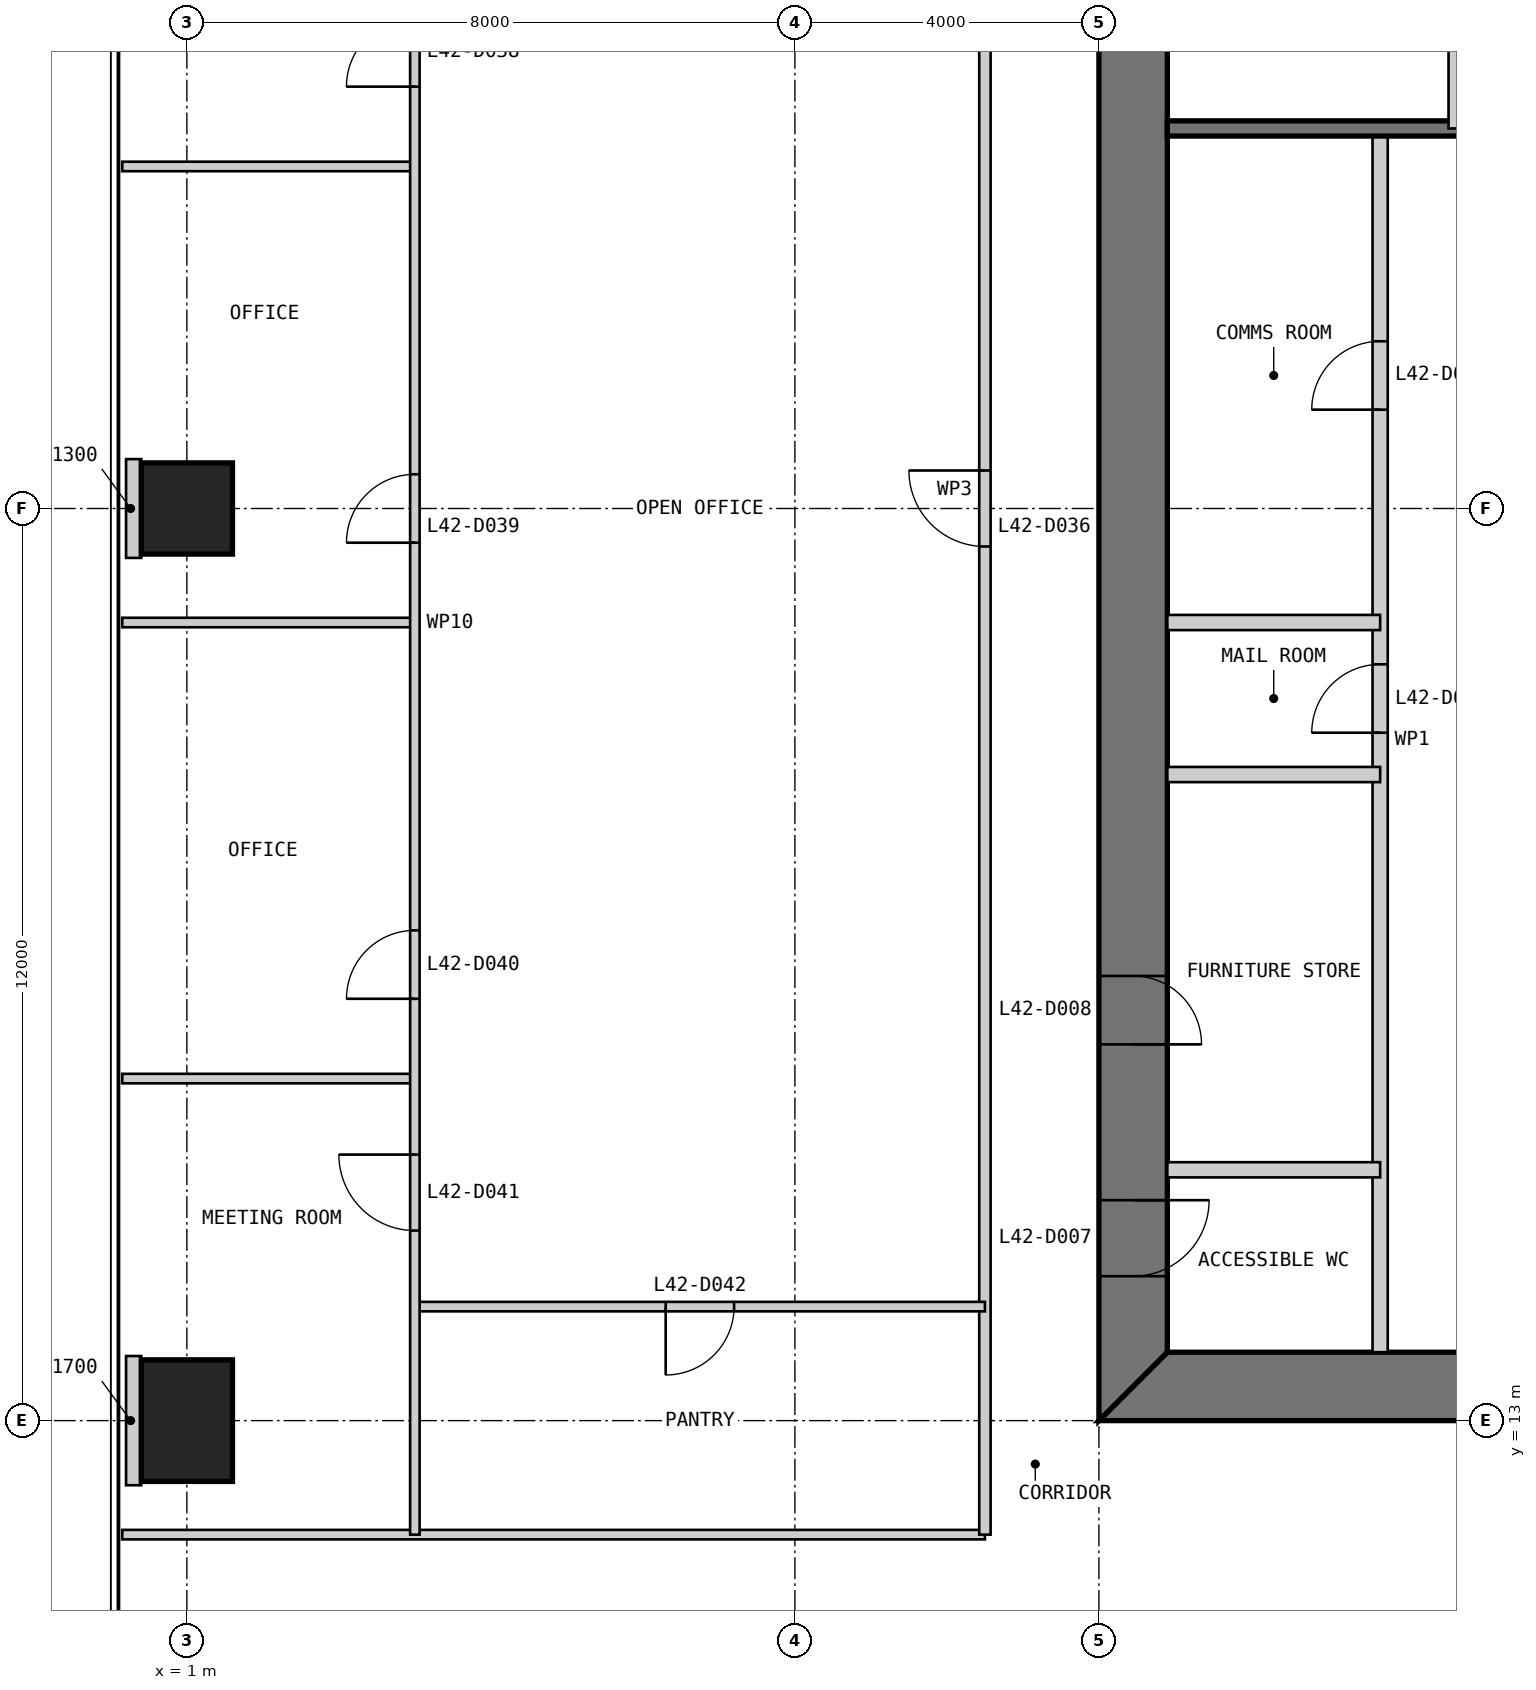
"""IFC4 building model, lengths in metres.
Left out: names, types, materials, properties, quantities, classifications, styles, units other than length and angle.
Written with IfcOpenShell. Run it as: python <this file> out.ifc"""

import sys

from ifc_helpers import new_model, si_unit, direction, frame, frame_2d, origin, origin_2d, place, context, subcontext, project, spatial, polyline, rectangle, outline, extrude, element, fill, save


model = new_model("IFC4")
c1 = context("Model", 3, precision=1e-05, world=origin(), true_north=direction((0.0, 1.0)))
c2 = subcontext(c1, "Body", "Model", "MODEL_VIEW")
j1 = project(units=[si_unit("LENGTHUNIT", "METRE"), si_unit("PLANEANGLEUNIT", "RADIAN")], contexts=[c1])
p1 = place(None, origin())
s1 = spatial("IfcSite", under=j1, at=p1, CompositionType="ELEMENT")
p2 = place(p1, origin())
s2 = spatial("IfcBuilding", under=s1, at=p2, CompositionType="ELEMENT")
p3 = place(p2, frame((0.0, 0.0, 181.8)))
s3 = spatial("IfcBuildingStorey", under=s2, at=p3, CompositionType="ELEMENT", Elevation=181.8)
p4 = place(p3, frame((1.0, 25.0, 0.0), z_axis=(0.0, 0.0, 1.0), x_axis=(1.0, 0.0, 0.0)))
e1 = element("IfcColumn", 1, at=p4, inside=s3, PredefinedType="COLUMN", context=c2, shape_type="SweptSolid", body=[
    extrude(rectangle(XDim=1.2, YDim=1.2, at=origin_2d()), origin(), (0.0, 0.0, 1.0), 4.0),
])
p5 = place(p3, frame((1.0, 13.0, 0.0), z_axis=(0.0, 0.0, 1.0), x_axis=(1.0, 0.0, 0.0)))
e2 = element("IfcColumn", 2, at=p5, inside=s3, PredefinedType="COLUMN", context=c2, shape_type="SweptSolid", body=[
    extrude(rectangle(XDim=1.2, YDim=1.6, at=origin_2d()), origin(), (0.0, 0.0, 1.0), 4.0),
])
p6 = place(p3, frame((13.0, 13.45, 0.0), z_axis=(0.0, 0.0, 1.0), x_axis=(1.0, 0.0, 0.0)))
e3 = element("IfcWall", 3, at=p6, inside=s3, PredefinedType="SHEAR", context=c2, shape_type="SweptSolid", body=[
    extrude(outline(polyline([(0.0, -0.45), (24.0, -0.45), (23.1, 0.45), (0.9, 0.45), (0.0, -0.45)])), origin(), (0.0, 0.0, 1.0), 4.0),
])
p7 = place(p6, frame((4.9, 0.0, 0.0)))
e4 = element("IfcOpeningElement", 4, at=p7, cuts=e3, PredefinedType="OPENING", context=c2, shape_type="SweptSolid", body=[
    extrude(rectangle(XDim=1.0, YDim=2.2, at=frame_2d((0.5, 1.1))), frame((0.0, 0.46, 0.0), z_axis=(0.0, -1.0, 0.0), x_axis=(1.0, 0.0, 0.0)), (0.0, 0.0, 1.0), 0.92),
])
p8 = place(p6, frame((8.9, 0.0, 0.0)))
e5 = element("IfcOpeningElement", 5, at=p8, cuts=e3, PredefinedType="OPENING", context=c2, shape_type="SweptSolid", body=[
    extrude(rectangle(XDim=1.1, YDim=2.2, at=frame_2d((0.55, 1.1))), frame((0.0, 0.46, 0.0), z_axis=(0.0, -1.0, 0.0), x_axis=(1.0, 0.0, 0.0)), (0.0, 0.0, 1.0), 0.92),
])
p9 = place(p6, frame((15.05, 0.0, 0.0)))
e6 = element("IfcOpeningElement", 6, at=p9, cuts=e3, PredefinedType="OPENING", context=c2, shape_type="SweptSolid", body=[
    extrude(rectangle(XDim=0.9, YDim=2.2, at=frame_2d((0.45, 1.1))), frame((0.0, 0.46, 0.0), z_axis=(0.0, -1.0, 0.0), x_axis=(1.0, 0.0, 0.0)), (0.0, 0.0, 1.0), 0.92),
])
p10 = place(p6, frame((17.9, 0.0, 0.0)))
e7 = element("IfcOpeningElement", 7, at=p10, cuts=e3, PredefinedType="OPENING", context=c2, shape_type="SweptSolid", body=[
    extrude(rectangle(XDim=1.0, YDim=2.2, at=frame_2d((0.5, 1.1))), frame((0.0, 0.46, 0.0), z_axis=(0.0, -1.0, 0.0), x_axis=(1.0, 0.0, 0.0)), (0.0, 0.0, 1.0), 0.92),
])
p11 = place(p6, frame((21.4, 0.0, 0.0)))
e8 = element("IfcOpeningElement", 8, at=p11, cuts=e3, PredefinedType="OPENING", context=c2, shape_type="SweptSolid", body=[
    extrude(rectangle(XDim=1.0, YDim=2.2, at=frame_2d((0.5, 1.1))), frame((0.0, 0.46, 0.0), z_axis=(0.0, -1.0, 0.0), x_axis=(1.0, 0.0, 0.0)), (0.0, 0.0, 1.0), 0.92),
])
p12 = place(p3, frame((13.45, 36.1, 0.0), z_axis=(0.0, 0.0, 1.0), x_axis=(0.0, -1.0, 0.0)))
e9 = element("IfcWall", 9, at=p12, inside=s3, PredefinedType="SHEAR", context=c2, shape_type="SweptSolid", body=[
    extrude(outline(polyline([(-0.9, -0.45), (23.1, -0.45), (22.2, 0.45), (0.0, 0.45), (-0.9, -0.45)])), origin(), (0.0, 0.0, 1.0), 4.0),
])
p13 = place(p12, frame((20.2, 0.0, 0.0)))
e10 = element("IfcOpeningElement", 10, at=p13, cuts=e9, PredefinedType="OPENING", context=c2, shape_type="SweptSolid", body=[
    extrude(rectangle(XDim=1.0, YDim=2.2, at=frame_2d((0.5, 1.1))), frame((0.0, 0.46, 0.0), z_axis=(0.0, -1.0, 0.0), x_axis=(1.0, 0.0, 0.0)), (0.0, 0.0, 1.0), 0.92),
])
p14 = place(p12, frame((17.25, 0.0, 0.0)))
e11 = element("IfcOpeningElement", 11, at=p14, cuts=e9, PredefinedType="OPENING", context=c2, shape_type="SweptSolid", body=[
    extrude(rectangle(XDim=0.9, YDim=2.2, at=frame_2d((0.45, 1.1))), frame((0.0, 0.46, 0.0), z_axis=(0.0, -1.0, 0.0), x_axis=(1.0, 0.0, 0.0)), (0.0, 0.0, 1.0), 0.92),
])
p15 = place(p3, frame((16.7, 13.9, 0.0), z_axis=(0.0, 0.0, 1.0), x_axis=(0.0, 1.0, 0.0)))
e12 = element("IfcWall", 12, at=p15, inside=s3, PredefinedType="PARTITIONING", context=c2, shape_type="SweptSolid", body=[
    extrude(rectangle(XDim=16.1, YDim=0.2, at=frame_2d((8.05, 0.0))), origin(), (0.0, 0.0, 1.0), 3.8),
])
p16 = place(p15, frame((8.15, 0.0, 0.0)))
e13 = element("IfcOpeningElement", 13, at=p16, cuts=e12, PredefinedType="OPENING", context=c2, shape_type="SweptSolid", body=[
    extrude(rectangle(XDim=0.9, YDim=2.2, at=frame_2d((0.45, 1.1))), frame((0.0, 0.11, 0.0), z_axis=(0.0, -1.0, 0.0), x_axis=(1.0, 0.0, 0.0)), (0.0, 0.0, 1.0), 0.22),
])
p17 = place(p15, frame((12.4, 0.0, 0.0)))
e14 = element("IfcOpeningElement", 14, at=p17, cuts=e12, PredefinedType="OPENING", context=c2, shape_type="SweptSolid", body=[
    extrude(rectangle(XDim=0.9, YDim=2.2, at=frame_2d((0.45, 1.1))), frame((0.0, 0.11, 0.0), z_axis=(0.0, -1.0, 0.0), x_axis=(1.0, 0.0, 0.0)), (0.0, 0.0, 1.0), 0.22),
])
for number, where, z_axis, x_axis in (
    (15, (13.9, 16.3, 0.0), (0.0, 0.0, 1.0), (1.0, 0.0, 0.0)),
    (16, (13.9, 21.5, 0.0), (0.0, 0.0, 1.0), (1.0, 0.0, 0.0)),
    (17, (13.9, 23.5, 0.0), (0.0, 0.0, 1.0), (1.0, 0.0, 0.0)),
):
    element("IfcWall", number, at=place(p3, frame(where, z_axis=z_axis, x_axis=x_axis)), inside=s3, PredefinedType="PARTITIONING", context=c2, shape_type="SweptSolid", body=[
        extrude(rectangle(XDim=2.8, YDim=0.2, at=frame_2d((1.4, 0.0))), origin(), (0.0, 0.0, 1.0), 3.8),
    ])
p18 = place(p3, frame((29.7, 30.0, 0.0), z_axis=(0.0, 0.0, 1.0), x_axis=(-1.0, 0.0, 0.0)))
e18 = element("IfcWall", 18, at=p18, inside=s3, PredefinedType="SOLIDWALL", context=c2, shape_type="SweptSolid", body=[
    extrude(rectangle(XDim=15.8, YDim=0.2, at=frame_2d((7.9, 0.0))), origin(), (0.0, 0.0, 1.0), 3.8),
])
p19 = place(p3, frame((17.7, 36.1, 0.0), z_axis=(0.0, 0.0, 1.0), x_axis=(0.0, -1.0, 0.0)))
e19 = element("IfcWall", 19, at=p19, inside=s3, PredefinedType="PARTITIONING", context=c2, shape_type="SweptSolid", body=[
    extrude(rectangle(XDim=6.1, YDim=0.2, at=frame_2d((3.05, 0.0))), origin(), (0.0, 0.0, 1.0), 3.8),
])
p20 = place(p3, frame((0.15, 11.5, 0.0), z_axis=(0.0, 0.0, 1.0), x_axis=(1.0, 0.0, 0.0)))
e20 = element("IfcWall", 20, at=p20, inside=s3, PredefinedType="PARTITIONING", context=c2, shape_type="SweptSolid", body=[
    extrude(rectangle(XDim=11.35, YDim=0.125, at=frame_2d((5.675, 0.0))), origin(), (0.0, 0.0, 1.0), 3.85),
])
p21 = place(p3, frame((11.5, 38.5, 0.0), z_axis=(0.0, 0.0, 1.0), x_axis=(0.0, -1.0, 0.0)))
e21 = element("IfcWall", 21, at=p21, inside=s3, PredefinedType="PARTITIONING", context=c2, shape_type="SweptSolid", body=[
    extrude(rectangle(XDim=27.0, YDim=0.15, at=frame_2d((13.5, 0.0))), origin(), (0.0, 0.0, 1.0), 3.85),
])
p22 = place(p21, frame((13.0, 0.0, 0.0)))
e22 = element("IfcOpeningElement", 22, at=p22, cuts=e21, PredefinedType="OPENING", context=c2, shape_type="SweptSolid", body=[
    extrude(rectangle(XDim=1.0, YDim=2.2, at=frame_2d((0.5, 1.1))), frame((0.0, 0.085, 0.0), z_axis=(0.0, -1.0, 0.0), x_axis=(1.0, 0.0, 0.0)), (0.0, 0.0, 1.0), 0.17),
])
for number, where, z_axis, x_axis in (
    (23, (0.15, 29.5, 0.0), (0.0, 0.0, 1.0), (1.0, 0.0, 0.0)),
    (24, (0.15, 23.5, 0.0), (0.0, 0.0, 1.0), (1.0, 0.0, 0.0)),
    (25, (0.15, 17.5, 0.0), (0.0, 0.0, 1.0), (1.0, 0.0, 0.0)),
):
    element("IfcWall", number, at=place(p3, frame(where, z_axis=z_axis, x_axis=x_axis)), inside=s3, PredefinedType="PARTITIONING", context=c2, shape_type="SweptSolid", body=[
        extrude(rectangle(XDim=3.85, YDim=0.125, at=frame_2d((1.925, 0.0))), origin(), (0.0, 0.0, 1.0), 3.85),
    ])
p23 = place(p3, frame((4.0, 14.5, 0.0), z_axis=(0.0, 0.0, 1.0), x_axis=(1.0, 0.0, 0.0)))
e26 = element("IfcWall", 26, at=p23, inside=s3, PredefinedType="PARTITIONING", context=c2, shape_type="SweptSolid", body=[
    extrude(rectangle(XDim=7.5, YDim=0.125, at=frame_2d((3.75, 0.0))), origin(), (0.0, 0.0, 1.0), 3.85),
])
p24 = place(p23, frame((3.3, 0.0, 0.0)))
e27 = element("IfcOpeningElement", 27, at=p24, cuts=e26, PredefinedType="OPENING", context=c2, shape_type="SweptSolid", body=[
    extrude(rectangle(XDim=0.9, YDim=2.2, at=frame_2d((0.45, 1.1))), frame((0.0, 0.073, 0.0), z_axis=(0.0, -1.0, 0.0), x_axis=(1.0, 0.0, 0.0)), (0.0, 0.0, 1.0), 0.145),
])
p25 = place(p3, frame((4.0, 35.5, 0.0), z_axis=(0.0, 0.0, 1.0), x_axis=(0.0, -1.0, 0.0)))
e28 = element("IfcWall", 28, at=p25, inside=s3, PredefinedType="PARTITIONING", context=c2, shape_type="SweptSolid", body=[
    extrude(rectangle(XDim=24.0, YDim=0.125, at=frame_2d((12.0, 0.0))), origin(), (0.0, 0.0, 1.0), 3.238),
])
p26 = place(p25, frame((4.05, 0.0, 0.0)))
e29 = element("IfcOpeningElement", 29, at=p26, cuts=e28, PredefinedType="OPENING", context=c2, shape_type="SweptSolid", body=[
    extrude(rectangle(XDim=0.9, YDim=2.2, at=frame_2d((0.45, 1.1))), frame((0.0, 0.073, 0.0), z_axis=(0.0, -1.0, 0.0), x_axis=(1.0, 0.0, 0.0)), (0.0, 0.0, 1.0), 0.145),
])
p27 = place(p25, frame((10.05, 0.0, 0.0)))
e30 = element("IfcOpeningElement", 30, at=p27, cuts=e28, PredefinedType="OPENING", context=c2, shape_type="SweptSolid", body=[
    extrude(rectangle(XDim=0.9, YDim=2.2, at=frame_2d((0.45, 1.1))), frame((0.0, 0.073, 0.0), z_axis=(0.0, -1.0, 0.0), x_axis=(1.0, 0.0, 0.0)), (0.0, 0.0, 1.0), 0.145),
])
p28 = place(p25, frame((16.05, 0.0, 0.0)))
e31 = element("IfcOpeningElement", 31, at=p28, cuts=e28, PredefinedType="OPENING", context=c2, shape_type="SweptSolid", body=[
    extrude(rectangle(XDim=0.9, YDim=2.2, at=frame_2d((0.45, 1.1))), frame((0.0, 0.073, 0.0), z_axis=(0.0, -1.0, 0.0), x_axis=(1.0, 0.0, 0.0)), (0.0, 0.0, 1.0), 0.145),
])
p29 = place(p25, frame((19.0, 0.0, 0.0)))
e32 = element("IfcOpeningElement", 32, at=p29, cuts=e28, PredefinedType="OPENING", context=c2, shape_type="SweptSolid", body=[
    extrude(rectangle(XDim=1.0, YDim=2.2, at=frame_2d((0.5, 1.1))), frame((0.0, 0.073, 0.0), z_axis=(0.0, -1.0, 0.0), x_axis=(1.0, 0.0, 0.0)), (0.0, 0.0, 1.0), 0.145),
])
p30 = place(p3, frame((0.2, 25.0, 0.0), z_axis=(0.0, 0.0, 1.0), x_axis=(1.0, 0.0, 0.0)))
e33 = element("IfcWall", 33, at=p30, inside=s3, PredefinedType="PARTITIONING", context=c2, shape_type="SweptSolid", body=[
    extrude(rectangle(XDim=0.2, YDim=1.3, at=frame_2d((0.1, 0.0))), origin(), (0.0, 0.0, 1.0), 3.85),
])
p31 = place(p3, frame((0.2, 13.0, 0.0), z_axis=(0.0, 0.0, 1.0), x_axis=(1.0, 0.0, 0.0)))
e34 = element("IfcWall", 34, at=p31, inside=s3, PredefinedType="PARTITIONING", context=c2, shape_type="SweptSolid", body=[
    extrude(rectangle(XDim=0.2, YDim=1.7, at=frame_2d((0.1, 0.0))), origin(), (0.0, 0.0, 1.0), 3.85),
])
p32 = place(p13, origin())
e35 = element("IfcDoor", 35, at=p32, inside=s3, OperationType="SINGLE_SWING_LEFT", PredefinedType="DOOR", context=c2, shape_type="SweptSolid", body=[
    extrude(rectangle(XDim=1.0, YDim=2.2, at=frame_2d((0.5, 1.1))), frame((0.0, 0.025, 0.0), z_axis=(0.0, -1.0, 0.0), x_axis=(1.0, 0.0, 0.0)), (0.0, 0.0, 1.0), 0.05),
    extrude(outline(polyline([(0.0, 0.0), (0.04, 0.0), (0.04, 2.16), (0.96, 2.16), (0.96, 0.0), (1.0, 0.0), (1.0, 2.2), (0.0, 2.2), (0.0, 0.0)])), frame((0.0, 0.3, 0.0), z_axis=(0.0, -1.0, 0.0), x_axis=(1.0, 0.0, 0.0)), (0.0, 0.0, 1.0), 0.6),
])
fill(e10, e35)
p33 = place(p14, origin())
e36 = element("IfcDoor", 36, at=p33, inside=s3, OperationType="SINGLE_SWING_RIGHT", PredefinedType="DOOR", context=c2, shape_type="SweptSolid", body=[
    extrude(rectangle(XDim=0.9, YDim=2.2, at=frame_2d((0.45, 1.1))), frame((0.0, 0.025, 0.0), z_axis=(0.0, -1.0, 0.0), x_axis=(1.0, 0.0, 0.0)), (0.0, 0.0, 1.0), 0.05),
    extrude(outline(polyline([(0.0, 0.0), (0.04, 0.0), (0.04, 2.16), (0.86, 2.16), (0.86, 0.0), (0.9, 0.0), (0.9, 2.2), (0.0, 2.2), (0.0, 0.0)])), frame((0.0, 0.3, 0.0), z_axis=(0.0, -1.0, 0.0), x_axis=(1.0, 0.0, 0.0)), (0.0, 0.0, 1.0), 0.6),
])
fill(e11, e36)
p34 = place(p16, origin())
e37 = element("IfcDoor", 37, at=p34, inside=s3, OperationType="SINGLE_SWING_LEFT", PredefinedType="DOOR", context=c2, shape_type="SweptSolid", body=[
    extrude(rectangle(XDim=0.9, YDim=2.2, at=frame_2d((0.45, 1.1))), frame((0.0, 0.025, 0.0), z_axis=(0.0, -1.0, 0.0), x_axis=(1.0, 0.0, 0.0)), (0.0, 0.0, 1.0), 0.05),
])
fill(e13, e37)
p35 = place(p17, origin())
e38 = element("IfcDoor", 38, at=p35, inside=s3, OperationType="SINGLE_SWING_LEFT", PredefinedType="DOOR", context=c2, shape_type="SweptSolid", body=[
    extrude(rectangle(XDim=0.9, YDim=2.2, at=frame_2d((0.45, 1.1))), frame((0.0, 0.025, 0.0), z_axis=(0.0, -1.0, 0.0), x_axis=(1.0, 0.0, 0.0)), (0.0, 0.0, 1.0), 0.05),
])
fill(e14, e38)
p36 = place(p22, frame((1.0, 0.0, 0.0), z_axis=(0.0, 0.0, 1.0), x_axis=(-1.0, 0.0, 0.0)))
e39 = element("IfcDoor", 39, at=p36, inside=s3, OperationType="SINGLE_SWING_RIGHT", PredefinedType="DOOR", context=c2, shape_type="SweptSolid", body=[
    extrude(rectangle(XDim=1.0, YDim=2.2, at=frame_2d((0.5, 1.1))), frame((0.0, 0.025, 0.0), z_axis=(0.0, -1.0, 0.0), x_axis=(1.0, 0.0, 0.0)), (0.0, 0.0, 1.0), 0.05),
])
fill(e22, e39)
p37 = place(p26, frame((0.9, 0.0, 0.0), z_axis=(0.0, 0.0, 1.0), x_axis=(-1.0, 0.0, 0.0)))
e40 = element("IfcDoor", 40, at=p37, inside=s3, OperationType="SINGLE_SWING_LEFT", PredefinedType="DOOR", context=c2, shape_type="SweptSolid", body=[
    extrude(rectangle(XDim=0.9, YDim=2.2, at=frame_2d((0.45, 1.1))), frame((0.0, 0.025, 0.0), z_axis=(0.0, -1.0, 0.0), x_axis=(1.0, 0.0, 0.0)), (0.0, 0.0, 1.0), 0.05),
])
fill(e29, e40)
p38 = place(p27, frame((0.9, 0.0, 0.0), z_axis=(0.0, 0.0, 1.0), x_axis=(-1.0, 0.0, 0.0)))
e41 = element("IfcDoor", 41, at=p38, inside=s3, OperationType="SINGLE_SWING_LEFT", PredefinedType="DOOR", context=c2, shape_type="SweptSolid", body=[
    extrude(rectangle(XDim=0.9, YDim=2.2, at=frame_2d((0.45, 1.1))), frame((0.0, 0.025, 0.0), z_axis=(0.0, -1.0, 0.0), x_axis=(1.0, 0.0, 0.0)), (0.0, 0.0, 1.0), 0.05),
])
fill(e30, e41)
p39 = place(p28, frame((0.9, 0.0, 0.0), z_axis=(0.0, 0.0, 1.0), x_axis=(-1.0, 0.0, 0.0)))
e42 = element("IfcDoor", 42, at=p39, inside=s3, OperationType="SINGLE_SWING_LEFT", PredefinedType="DOOR", context=c2, shape_type="SweptSolid", body=[
    extrude(rectangle(XDim=0.9, YDim=2.2, at=frame_2d((0.45, 1.1))), frame((0.0, 0.025, 0.0), z_axis=(0.0, -1.0, 0.0), x_axis=(1.0, 0.0, 0.0)), (0.0, 0.0, 1.0), 0.05),
])
fill(e31, e42)
p40 = place(p29, frame((1.0, 0.0, 0.0), z_axis=(0.0, 0.0, 1.0), x_axis=(-1.0, 0.0, 0.0)))
e43 = element("IfcDoor", 43, at=p40, inside=s3, OperationType="SINGLE_SWING_RIGHT", PredefinedType="DOOR", context=c2, shape_type="SweptSolid", body=[
    extrude(rectangle(XDim=1.0, YDim=2.2, at=frame_2d((0.5, 1.1))), frame((0.0, 0.025, 0.0), z_axis=(0.0, -1.0, 0.0), x_axis=(1.0, 0.0, 0.0)), (0.0, 0.0, 1.0), 0.05),
])
fill(e32, e43)
p41 = place(p24, frame((0.9, 0.0, 0.0), z_axis=(0.0, 0.0, 1.0), x_axis=(-1.0, 0.0, 0.0)))
e44 = element("IfcDoor", 44, at=p41, inside=s3, OperationType="SINGLE_SWING_RIGHT", PredefinedType="DOOR", context=c2, shape_type="SweptSolid", body=[
    extrude(rectangle(XDim=0.9, YDim=2.2, at=frame_2d((0.45, 1.1))), frame((0.0, 0.025, 0.0), z_axis=(0.0, -1.0, 0.0), x_axis=(1.0, 0.0, 0.0)), (0.0, 0.0, 1.0), 0.05),
])
fill(e27, e44)
save(model, sys.argv[1])
